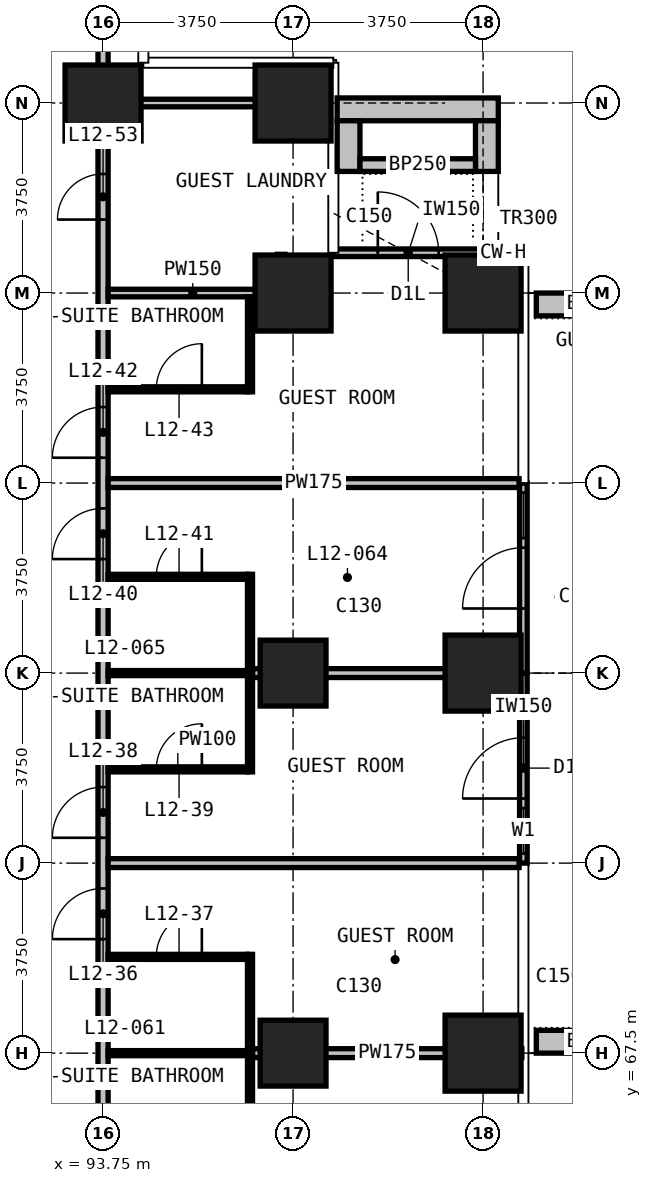
"""IFC4 building model, lengths in metres.
Left out: names, types, materials, properties, quantities, classifications, styles, units other than length and angle.
Written with IfcOpenShell. Run it as: python <this file> out.ifc"""

import sys

from ifc_helpers import new_model, si_unit, direction, frame, frame_2d, origin, origin_2d, place, context, subcontext, project, spatial, rectangle, extrude, element, fill, save


model = new_model("IFC4")
c1 = context("Model", 3, precision=1e-05, world=origin(), true_north=direction((0.0, 1.0)))
c2 = subcontext(c1, "Body", "Model", "MODEL_VIEW")
j1 = project(units=[si_unit("LENGTHUNIT", "METRE"), si_unit("PLANEANGLEUNIT", "RADIAN")], contexts=[c1])
p1 = place(None, origin())
s1 = spatial("IfcSite", under=j1, at=p1, CompositionType="ELEMENT")
p2 = place(p1, origin())
s2 = spatial("IfcBuilding", under=s1, at=p2, CompositionType="ELEMENT")
p3 = place(p2, frame((0.0, 0.0, 59.3)))
s3 = spatial("IfcBuildingStorey", under=s2, at=p3, CompositionType="ELEMENT", Elevation=59.3)
p4 = place(p3, frame((93.75, 86.25, 0.0), z_axis=(0.0, 0.0, 1.0), x_axis=(1.0, 0.0, 0.0)))
e1 = element("IfcColumn", 1, at=p4, inside=s3, PredefinedType="COLUMN", context=c2, shape_type="SweptSolid", body=[
    extrude(rectangle(XDim=1.5, YDim=1.5, at=origin_2d()), origin(), (0.0, 0.0, 1.0), 3.3),
])
for number, where, z_axis, x_axis in (
    (2, (97.5, 67.5, 0.0), (0.0, 0.0, 1.0), (1.0, 0.0, 0.0)),
    (3, (97.5, 75.0, 0.0), (0.0, 0.0, 1.0), (1.0, 0.0, 0.0)),
):
    element("IfcColumn", number, at=place(p3, frame(where, z_axis=z_axis, x_axis=x_axis)), inside=s3, PredefinedType="COLUMN", context=c2, shape_type="SweptSolid", body=[
        extrude(rectangle(XDim=1.3, YDim=1.3, at=origin_2d()), origin(), (0.0, 0.0, 1.0), 3.3),
    ])
for number, where, z_axis, x_axis in (
    (4, (97.5, 82.5, 0.0), (0.0, 0.0, 1.0), (1.0, 0.0, 0.0)),
    (5, (97.5, 86.25, 0.0), (0.0, 0.0, 1.0), (1.0, 0.0, 0.0)),
    (6, (101.25, 67.5, 0.0), (0.0, 0.0, 1.0), (1.0, 0.0, 0.0)),
    (7, (101.25, 75.0, 0.0), (0.0, 0.0, 1.0), (1.0, 0.0, 0.0)),
    (8, (101.25, 82.5, 0.0), (0.0, 0.0, 1.0), (1.0, 0.0, 0.0)),
):
    element("IfcColumn", number, at=place(p3, frame(where, z_axis=z_axis, x_axis=x_axis)), inside=s3, PredefinedType="COLUMN", context=c2, shape_type="SweptSolid", body=[
        extrude(rectangle(XDim=1.5, YDim=1.5, at=origin_2d()), origin(), (0.0, 0.0, 1.0), 3.3),
    ])
p5 = place(p3, frame((102.045, 71.25, 0.0), z_axis=(0.0, 0.0, 1.0), x_axis=(0.0, 1.0, 0.0)))
e9 = element("IfcWall", 9, at=p5, inside=s3, PredefinedType="SOLIDWALL", context=c2, shape_type="SweptSolid", body=[
    extrude(rectangle(XDim=3.75, YDim=0.15, at=frame_2d((1.875, 0.0))), origin(), (0.0, 0.0, 1.0), 3.0),
])
p6 = place(p5, frame((0.188, 0.0, 0.1)))
e10 = element("IfcOpeningElement", 10, at=p6, cuts=e9, PredefinedType="OPENING", context=c2, shape_type="SweptSolid", body=[
    extrude(rectangle(XDim=0.9, YDim=2.4, at=frame_2d((0.45, 1.2))), frame((0.0, 0.085, 0.0), z_axis=(0.0, -1.0, 0.0), x_axis=(1.0, 0.0, 0.0)), (0.0, 0.0, 1.0), 0.17),
])
p7 = place(p5, frame((1.275, 0.0, 0.0)))
e11 = element("IfcOpeningElement", 11, at=p7, cuts=e9, PredefinedType="OPENING", context=c2, shape_type="SweptSolid", body=[
    extrude(rectangle(XDim=1.2, YDim=2.4, at=frame_2d((0.6, 1.2))), frame((0.0, 0.085, 0.0), z_axis=(0.0, -1.0, 0.0), x_axis=(1.0, 0.0, 0.0)), (0.0, 0.0, 1.0), 0.17),
])
p8 = place(p3, frame((102.045, 75.0, 0.0), z_axis=(0.0, 0.0, 1.0), x_axis=(0.0, 1.0, 0.0)))
e12 = element("IfcWall", 12, at=p8, inside=s3, PredefinedType="SOLIDWALL", context=c2, shape_type="SweptSolid", body=[
    extrude(rectangle(XDim=3.75, YDim=0.15, at=frame_2d((1.875, 0.0))), origin(), (0.0, 0.0, 1.0), 3.0),
])
p9 = place(p8, frame((1.275, 0.0, 0.0)))
e13 = element("IfcOpeningElement", 13, at=p9, cuts=e12, PredefinedType="OPENING", context=c2, shape_type="SweptSolid", body=[
    extrude(rectangle(XDim=1.2, YDim=2.4, at=frame_2d((0.6, 1.2))), frame((0.0, 0.085, 0.0), z_axis=(0.0, -1.0, 0.0), x_axis=(1.0, 0.0, 0.0)), (0.0, 0.0, 1.0), 0.17),
])
p10 = place(p8, frame((2.663, 0.0, 0.1)))
e14 = element("IfcOpeningElement", 14, at=p10, cuts=e12, PredefinedType="OPENING", context=c2, shape_type="SweptSolid", body=[
    extrude(rectangle(XDim=0.9, YDim=2.4, at=frame_2d((0.45, 1.2))), frame((0.0, 0.085, 0.0), z_axis=(0.0, -1.0, 0.0), x_axis=(1.0, 0.0, 0.0)), (0.0, 0.0, 1.0), 0.17),
])
p11 = place(p3, frame((98.295, 83.295, 0.0), z_axis=(0.0, 0.0, 1.0), x_axis=(1.0, 0.0, 0.0)))
e15 = element("IfcWall", 15, at=p11, inside=s3, PredefinedType="SOLIDWALL", context=c2, shape_type="SweptSolid", body=[
    extrude(rectangle(XDim=2.955, YDim=0.15, at=frame_2d((1.478, 0.0))), origin(), (0.0, 0.0, 1.0), 3.0),
])
p12 = place(p11, frame((0.877, 0.0, 0.0)))
e16 = element("IfcOpeningElement", 16, at=p12, cuts=e15, PredefinedType="OPENING", context=c2, shape_type="SweptSolid", body=[
    extrude(rectangle(XDim=1.2, YDim=2.0, at=frame_2d((0.6, 1.0))), frame((0.0, 0.085, 0.0), z_axis=(0.0, -1.0, 0.0), x_axis=(1.0, 0.0, 0.0)), (0.0, 0.0, 1.0), 0.17),
])
for number, where, z_axis, x_axis in (
    (17, (102.3, 67.725, 0.0), (0.0, 0.0, 1.0), (1.0, 0.0, 0.0)),
    (18, (102.3, 82.275, 0.0), (0.0, 0.0, 1.0), (1.0, 0.0, 0.0)),
):
    element("IfcWall", number, at=place(p3, frame(where, z_axis=z_axis, x_axis=x_axis)), inside=s3, PredefinedType="USERDEFINED", context=c2, shape_type="SweptSolid", body=[
        extrude(rectangle(XDim=2.35, YDim=0.45, at=frame_2d((1.175, 0.0))), origin(), (0.0, 0.0, 1.0), 1.1),
    ])
p13 = place(p3, frame((98.37, 86.125, 0.0), z_axis=(0.0, 0.0, 1.0), x_axis=(1.0, 0.0, 0.0)))
e19 = element("IfcWall", 19, at=p13, inside=s3, PredefinedType="USERDEFINED", context=c2, shape_type="SweptSolid", body=[
    extrude(rectangle(XDim=3.18, YDim=0.45, at=frame_2d((1.59, 0.0))), origin(), (0.0, 0.0, 1.0), 1.1),
])
for number, where, z_axis, x_axis in (
    (20, (98.595, 84.9, 0.0), (0.0, 0.0, 1.0), (0.0, 1.0, 0.0)),
    (21, (101.325, 84.9, 0.0), (0.0, 0.0, 1.0), (0.0, 1.0, 0.0)),
):
    element("IfcWall", number, at=place(p3, frame(where, z_axis=z_axis, x_axis=x_axis)), inside=s3, PredefinedType="USERDEFINED", context=c2, shape_type="SweptSolid", body=[
        extrude(rectangle(XDim=1.0, YDim=0.45, at=frame_2d((0.5, 0.0))), origin(), (0.0, 0.0, 1.0), 1.1),
    ])
p14 = place(p3, frame((98.82, 85.025, 0.0), z_axis=(0.0, 0.0, 1.0), x_axis=(1.0, 0.0, 0.0)))
e22 = element("IfcWall", 22, at=p14, inside=s3, PredefinedType="USERDEFINED", context=c2, shape_type="SweptSolid", body=[
    extrude(rectangle(XDim=2.28, YDim=0.25, at=frame_2d((1.14, 0.0))), origin(), (0.0, 0.0, 1.0), 1.0),
])
p15 = place(p3, frame((93.75, 52.4, 0.0), z_axis=(0.0, 0.0, 1.0), x_axis=(0.0, 1.0, 0.0)))
e23 = element("IfcWall", 23, at=p15, inside=s3, PredefinedType="PARTITIONING", context=c2, shape_type="SweptSolid", body=[
    extrude(rectangle(XDim=33.925, YDim=0.2, at=frame_2d((16.962, 0.0))), origin(), (0.0, 0.0, 1.0), 3.0),
])
p16 = place(p15, frame((2.35, 0.0, 0.0)))
e24 = element("IfcOpeningElement", 24, at=p16, cuts=e23, PredefinedType="OPENING", context=c2, shape_type="SweptSolid", body=[
    extrude(rectangle(XDim=1.0, YDim=2.2, at=frame_2d((0.5, 1.1))), frame((0.0, 0.11, 0.0), z_axis=(0.0, -1.0, 0.0), x_axis=(1.0, 0.0, 0.0)), (0.0, 0.0, 1.0), 0.22),
])
p17 = place(p15, frame((4.35, 0.0, 0.0)))
e25 = element("IfcOpeningElement", 25, at=p17, cuts=e23, PredefinedType="OPENING", context=c2, shape_type="SweptSolid", body=[
    extrude(rectangle(XDim=1.0, YDim=2.2, at=frame_2d((0.5, 1.1))), frame((0.0, 0.11, 0.0), z_axis=(0.0, -1.0, 0.0), x_axis=(1.0, 0.0, 0.0)), (0.0, 0.0, 1.0), 0.22),
])
p18 = place(p15, frame((9.85, 0.0, 0.0)))
e26 = element("IfcOpeningElement", 26, at=p18, cuts=e23, PredefinedType="OPENING", context=c2, shape_type="SweptSolid", body=[
    extrude(rectangle(XDim=1.0, YDim=2.2, at=frame_2d((0.5, 1.1))), frame((0.0, 0.11, 0.0), z_axis=(0.0, -1.0, 0.0), x_axis=(1.0, 0.0, 0.0)), (0.0, 0.0, 1.0), 0.22),
])
p19 = place(p15, frame((11.85, 0.0, 0.0)))
e27 = element("IfcOpeningElement", 27, at=p19, cuts=e23, PredefinedType="OPENING", context=c2, shape_type="SweptSolid", body=[
    extrude(rectangle(XDim=1.0, YDim=2.2, at=frame_2d((0.5, 1.1))), frame((0.0, 0.11, 0.0), z_axis=(0.0, -1.0, 0.0), x_axis=(1.0, 0.0, 0.0)), (0.0, 0.0, 1.0), 0.22),
])
p20 = place(p15, frame((17.35, 0.0, 0.0)))
e28 = element("IfcOpeningElement", 28, at=p20, cuts=e23, PredefinedType="OPENING", context=c2, shape_type="SweptSolid", body=[
    extrude(rectangle(XDim=1.0, YDim=2.2, at=frame_2d((0.5, 1.1))), frame((0.0, 0.11, 0.0), z_axis=(0.0, -1.0, 0.0), x_axis=(1.0, 0.0, 0.0)), (0.0, 0.0, 1.0), 0.22),
])
p21 = place(p15, frame((19.35, 0.0, 0.0)))
e29 = element("IfcOpeningElement", 29, at=p21, cuts=e23, PredefinedType="OPENING", context=c2, shape_type="SweptSolid", body=[
    extrude(rectangle(XDim=1.0, YDim=2.2, at=frame_2d((0.5, 1.1))), frame((0.0, 0.11, 0.0), z_axis=(0.0, -1.0, 0.0), x_axis=(1.0, 0.0, 0.0)), (0.0, 0.0, 1.0), 0.22),
])
p22 = place(p15, frame((24.85, 0.0, 0.0)))
e30 = element("IfcOpeningElement", 30, at=p22, cuts=e23, PredefinedType="OPENING", context=c2, shape_type="SweptSolid", body=[
    extrude(rectangle(XDim=1.0, YDim=2.2, at=frame_2d((0.5, 1.1))), frame((0.0, 0.11, 0.0), z_axis=(0.0, -1.0, 0.0), x_axis=(1.0, 0.0, 0.0)), (0.0, 0.0, 1.0), 0.22),
])
p23 = place(p15, frame((26.85, 0.0, 0.0)))
e31 = element("IfcOpeningElement", 31, at=p23, cuts=e23, PredefinedType="OPENING", context=c2, shape_type="SweptSolid", body=[
    extrude(rectangle(XDim=1.0, YDim=2.2, at=frame_2d((0.5, 1.1))), frame((0.0, 0.11, 0.0), z_axis=(0.0, -1.0, 0.0), x_axis=(1.0, 0.0, 0.0)), (0.0, 0.0, 1.0), 0.22),
])
p24 = place(p15, frame((31.55, 0.0, 0.0)))
e32 = element("IfcOpeningElement", 32, at=p24, cuts=e23, PredefinedType="OPENING", context=c2, shape_type="SweptSolid", body=[
    extrude(rectangle(XDim=0.9, YDim=2.2, at=frame_2d((0.45, 1.1))), frame((0.0, 0.11, 0.0), z_axis=(0.0, -1.0, 0.0), x_axis=(1.0, 0.0, 0.0)), (0.0, 0.0, 1.0), 0.22),
])
p25 = place(p3, frame((93.75, 86.28, 0.0), z_axis=(0.0, 0.0, 1.0), x_axis=(0.0, 1.0, 0.0)))
e33 = element("IfcWall", 33, at=p25, inside=s3, PredefinedType="PARTITIONING", context=c2, shape_type="SweptSolid", body=[
    extrude(rectangle(XDim=4.365, YDim=0.2, at=frame_2d((2.183, 0.0))), origin(), (0.0, 0.0, 1.0), 3.0),
])
p26 = place(p3, frame((96.7, 67.5, 0.0), z_axis=(0.0, 0.0, 1.0), x_axis=(1.0, 0.0, 0.0)))
e34 = element("IfcWall", 34, at=p26, inside=s3, PredefinedType="PARTITIONING", context=c2, shape_type="SweptSolid", body=[
    extrude(rectangle(XDim=5.315, YDim=0.175, at=frame_2d((2.657, 0.0))), origin(), (0.0, 0.0, 1.0), 3.0),
])
p27 = place(p3, frame((93.85, 71.25, 0.0), z_axis=(0.0, 0.0, 1.0), x_axis=(1.0, 0.0, 0.0)))
e35 = element("IfcWall", 35, at=p27, inside=s3, PredefinedType="PARTITIONING", context=c2, shape_type="SweptSolid", body=[
    extrude(rectangle(XDim=8.11, YDim=0.175, at=frame_2d((4.055, 0.0))), origin(), (0.0, 0.0, 1.0), 3.0),
])
p28 = place(p3, frame((96.7, 75.0, 0.0), z_axis=(0.0, 0.0, 1.0), x_axis=(1.0, 0.0, 0.0)))
e36 = element("IfcWall", 36, at=p28, inside=s3, PredefinedType="PARTITIONING", context=c2, shape_type="SweptSolid", body=[
    extrude(rectangle(XDim=5.26, YDim=0.175, at=frame_2d((2.63, 0.0))), origin(), (0.0, 0.0, 1.0), 3.0),
])
p29 = place(p3, frame((93.85, 78.75, 0.0), z_axis=(0.0, 0.0, 1.0), x_axis=(1.0, 0.0, 0.0)))
e37 = element("IfcWall", 37, at=p29, inside=s3, PredefinedType="PARTITIONING", context=c2, shape_type="SweptSolid", body=[
    extrude(rectangle(XDim=8.11, YDim=0.175, at=frame_2d((4.055, 0.0))), origin(), (0.0, 0.0, 1.0), 3.0),
])
p30 = place(p3, frame((93.85, 82.5, 0.0), z_axis=(0.0, 0.0, 1.0), x_axis=(1.0, 0.0, 0.0)))
e38 = element("IfcWall", 38, at=p30, inside=s3, PredefinedType="PARTITIONING", context=c2, shape_type="SweptSolid", body=[
    extrude(rectangle(XDim=3.34, YDim=0.15, at=frame_2d((1.67, 0.0))), origin(), (0.0, 0.0, 1.0), 3.0),
])
p31 = place(p3, frame((93.85, 86.25, 0.0), z_axis=(0.0, 0.0, 1.0), x_axis=(1.0, 0.0, 0.0)))
e39 = element("IfcWall", 39, at=p31, inside=s3, PredefinedType="PARTITIONING", context=c2, shape_type="SweptSolid", body=[
    extrude(rectangle(XDim=4.295, YDim=0.15, at=frame_2d((2.147, 0.0))), origin(), (0.0, 0.0, 1.0), 3.0),
])
p32 = place(p3, frame((97.265, 82.425, 0.0), z_axis=(0.0, 0.0, 1.0), x_axis=(0.0, 1.0, 0.0)))
e40 = element("IfcWall", 40, at=p32, inside=s3, PredefinedType="PARTITIONING", context=c2, shape_type="SweptSolid", body=[
    extrude(rectangle(XDim=0.84, YDim=0.15, at=frame_2d((0.42, 0.0))), origin(), (0.0, 0.0, 1.0), 3.0),
])
p33 = place(p3, frame((93.85, 67.5, 0.0), z_axis=(0.0, 0.0, 1.0), x_axis=(1.0, 0.0, 0.0)))
e41 = element("IfcWall", 41, at=p33, inside=s3, PredefinedType="PARTITIONING", context=c2, shape_type="SweptSolid", body=[
    extrude(rectangle(XDim=2.75, YDim=0.1, at=frame_2d((1.375, 0.0))), origin(), (0.0, 0.0, 1.0), 3.0),
])
p34 = place(p3, frame((93.85, 69.4, 0.0), z_axis=(0.0, 0.0, 1.0), x_axis=(1.0, 0.0, 0.0)))
e42 = element("IfcWall", 42, at=p34, inside=s3, PredefinedType="PARTITIONING", context=c2, shape_type="SweptSolid", body=[
    extrude(rectangle(XDim=2.75, YDim=0.1, at=frame_2d((1.375, 0.0))), origin(), (0.0, 0.0, 1.0), 3.0),
])
p35 = place(p34, frame((0.95, 0.0, 0.0)))
e43 = element("IfcOpeningElement", 43, at=p35, cuts=e42, PredefinedType="OPENING", context=c2, shape_type="SweptSolid", body=[
    extrude(rectangle(XDim=0.9, YDim=2.2, at=frame_2d((0.45, 1.1))), frame((0.0, 0.06, 0.0), z_axis=(0.0, -1.0, 0.0), x_axis=(1.0, 0.0, 0.0)), (0.0, 0.0, 1.0), 0.12),
])
p36 = place(p3, frame((93.85, 73.1, 0.0), z_axis=(0.0, 0.0, 1.0), x_axis=(1.0, 0.0, 0.0)))
e44 = element("IfcWall", 44, at=p36, inside=s3, PredefinedType="PARTITIONING", context=c2, shape_type="SweptSolid", body=[
    extrude(rectangle(XDim=2.75, YDim=0.1, at=frame_2d((1.375, 0.0))), origin(), (0.0, 0.0, 1.0), 3.0),
])
p37 = place(p36, frame((0.95, 0.0, 0.0)))
e45 = element("IfcOpeningElement", 45, at=p37, cuts=e44, PredefinedType="OPENING", context=c2, shape_type="SweptSolid", body=[
    extrude(rectangle(XDim=0.9, YDim=2.2, at=frame_2d((0.45, 1.1))), frame((0.0, 0.06, 0.0), z_axis=(0.0, -1.0, 0.0), x_axis=(1.0, 0.0, 0.0)), (0.0, 0.0, 1.0), 0.12),
])
p38 = place(p3, frame((93.85, 75.0, 0.0), z_axis=(0.0, 0.0, 1.0), x_axis=(1.0, 0.0, 0.0)))
e46 = element("IfcWall", 46, at=p38, inside=s3, PredefinedType="PARTITIONING", context=c2, shape_type="SweptSolid", body=[
    extrude(rectangle(XDim=2.75, YDim=0.1, at=frame_2d((1.375, 0.0))), origin(), (0.0, 0.0, 1.0), 3.0),
])
p39 = place(p3, frame((93.85, 76.9, 0.0), z_axis=(0.0, 0.0, 1.0), x_axis=(1.0, 0.0, 0.0)))
e47 = element("IfcWall", 47, at=p39, inside=s3, PredefinedType="PARTITIONING", context=c2, shape_type="SweptSolid", body=[
    extrude(rectangle(XDim=2.75, YDim=0.1, at=frame_2d((1.375, 0.0))), origin(), (0.0, 0.0, 1.0), 3.0),
])
p40 = place(p39, frame((0.95, 0.0, 0.0)))
e48 = element("IfcOpeningElement", 48, at=p40, cuts=e47, PredefinedType="OPENING", context=c2, shape_type="SweptSolid", body=[
    extrude(rectangle(XDim=0.9, YDim=2.2, at=frame_2d((0.45, 1.1))), frame((0.0, 0.06, 0.0), z_axis=(0.0, -1.0, 0.0), x_axis=(1.0, 0.0, 0.0)), (0.0, 0.0, 1.0), 0.12),
])
p41 = place(p3, frame((93.85, 80.6, 0.0), z_axis=(0.0, 0.0, 1.0), x_axis=(1.0, 0.0, 0.0)))
e49 = element("IfcWall", 49, at=p41, inside=s3, PredefinedType="PARTITIONING", context=c2, shape_type="SweptSolid", body=[
    extrude(rectangle(XDim=2.75, YDim=0.1, at=frame_2d((1.375, 0.0))), origin(), (0.0, 0.0, 1.0), 3.0),
])
p42 = place(p41, frame((0.95, 0.0, 0.0)))
e50 = element("IfcOpeningElement", 50, at=p42, cuts=e49, PredefinedType="OPENING", context=c2, shape_type="SweptSolid", body=[
    extrude(rectangle(XDim=0.9, YDim=2.2, at=frame_2d((0.45, 1.1))), frame((0.0, 0.06, 0.0), z_axis=(0.0, -1.0, 0.0), x_axis=(1.0, 0.0, 0.0)), (0.0, 0.0, 1.0), 0.12),
])
for number, where, z_axis, x_axis in (
    (51, (96.65, 65.55, 0.0), (0.0, 0.0, 1.0), (0.0, 1.0, 0.0)),
    (52, (96.65, 73.05, 0.0), (0.0, 0.0, 1.0), (0.0, 1.0, 0.0)),
):
    element("IfcWall", number, at=place(p3, frame(where, z_axis=z_axis, x_axis=x_axis)), inside=s3, PredefinedType="PARTITIONING", context=c2, shape_type="SweptSolid", body=[
        extrude(rectangle(XDim=3.9, YDim=0.1, at=frame_2d((1.95, 0.0))), origin(), (0.0, 0.0, 1.0), 3.0),
    ])
p43 = place(p3, frame((96.65, 80.55, 0.0), z_axis=(0.0, 0.0, 1.0), x_axis=(0.0, 1.0, 0.0)))
e53 = element("IfcWall", 53, at=p43, inside=s3, PredefinedType="PARTITIONING", context=c2, shape_type="SweptSolid", body=[
    extrude(rectangle(XDim=1.875, YDim=0.1, at=frame_2d((0.938, 0.0))), origin(), (0.0, 0.0, 1.0), 3.0),
])
p44 = place(p6, origin())
e54 = element("IfcWindow", 54, at=p44, inside=s3, PartitioningType="SINGLE_PANEL", PredefinedType="WINDOW", context=c2, shape_type="SweptSolid", body=[
    extrude(rectangle(XDim=0.9, YDim=2.4, at=frame_2d((0.45, 1.2))), frame((0.0, 0.03, 0.0), z_axis=(0.0, -1.0, 0.0), x_axis=(1.0, 0.0, 0.0)), (0.0, 0.0, 1.0), 0.06),
])
fill(e10, e54)
p45 = place(p7, origin())
e55 = element("IfcDoor", 55, at=p45, inside=s3, OperationType="SINGLE_SWING_LEFT", PredefinedType="DOOR", context=c2, shape_type="SweptSolid", body=[
    extrude(rectangle(XDim=1.2, YDim=2.4, at=frame_2d((0.6, 1.2))), frame((0.0, 0.025, 0.0), z_axis=(0.0, -1.0, 0.0), x_axis=(1.0, 0.0, 0.0)), (0.0, 0.0, 1.0), 0.05),
])
fill(e11, e55)
p46 = place(p9, origin())
e56 = element("IfcDoor", 56, at=p46, inside=s3, OperationType="SINGLE_SWING_LEFT", PredefinedType="DOOR", context=c2, shape_type="SweptSolid", body=[
    extrude(rectangle(XDim=1.2, YDim=2.4, at=frame_2d((0.6, 1.2))), frame((0.0, 0.025, 0.0), z_axis=(0.0, -1.0, 0.0), x_axis=(1.0, 0.0, 0.0)), (0.0, 0.0, 1.0), 0.05),
])
fill(e13, e56)
p47 = place(p10, origin())
e57 = element("IfcWindow", 57, at=p47, inside=s3, PartitioningType="SINGLE_PANEL", PredefinedType="WINDOW", context=c2, shape_type="SweptSolid", body=[
    extrude(rectangle(XDim=0.9, YDim=2.4, at=frame_2d((0.45, 1.2))), frame((0.0, 0.03, 0.0), z_axis=(0.0, -1.0, 0.0), x_axis=(1.0, 0.0, 0.0)), (0.0, 0.0, 1.0), 0.06),
])
fill(e14, e57)
p48 = place(p12, origin())
e58 = element("IfcDoor", 58, at=p48, inside=s3, OperationType="SINGLE_SWING_LEFT", PredefinedType="DOOR", context=c2, shape_type="SweptSolid", body=[
    extrude(rectangle(XDim=1.2, YDim=2.0, at=frame_2d((0.6, 1.0))), frame((0.0, 0.025, 0.0), z_axis=(0.0, -1.0, 0.0), x_axis=(1.0, 0.0, 0.0)), (0.0, 0.0, 1.0), 0.05),
])
fill(e16, e58)
p49 = place(p20, origin())
e59 = element("IfcDoor", 59, at=p49, inside=s3, OperationType="SINGLE_SWING_LEFT", PredefinedType="DOOR", context=c2, shape_type="SweptSolid", body=[
    extrude(rectangle(XDim=1.0, YDim=2.2, at=frame_2d((0.5, 1.1))), frame((0.0, 0.025, 0.0), z_axis=(0.0, -1.0, 0.0), x_axis=(1.0, 0.0, 0.0)), (0.0, 0.0, 1.0), 0.05),
])
fill(e28, e59)
p50 = place(p35, origin())
e60 = element("IfcDoor", 60, at=p50, inside=s3, OperationType="SINGLE_SWING_RIGHT", PredefinedType="DOOR", context=c2, shape_type="SweptSolid", body=[
    extrude(rectangle(XDim=0.9, YDim=2.2, at=frame_2d((0.45, 1.1))), frame((0.0, 0.025, 0.0), z_axis=(0.0, -1.0, 0.0), x_axis=(1.0, 0.0, 0.0)), (0.0, 0.0, 1.0), 0.05),
])
fill(e43, e60)
p51 = place(p21, origin())
e61 = element("IfcDoor", 61, at=p51, inside=s3, OperationType="SINGLE_SWING_LEFT", PredefinedType="DOOR", context=c2, shape_type="SweptSolid", body=[
    extrude(rectangle(XDim=1.0, YDim=2.2, at=frame_2d((0.5, 1.1))), frame((0.0, 0.025, 0.0), z_axis=(0.0, -1.0, 0.0), x_axis=(1.0, 0.0, 0.0)), (0.0, 0.0, 1.0), 0.05),
])
fill(e29, e61)
p52 = place(p37, origin())
e62 = element("IfcDoor", 62, at=p52, inside=s3, OperationType="SINGLE_SWING_RIGHT", PredefinedType="DOOR", context=c2, shape_type="SweptSolid", body=[
    extrude(rectangle(XDim=0.9, YDim=2.2, at=frame_2d((0.45, 1.1))), frame((0.0, 0.025, 0.0), z_axis=(0.0, -1.0, 0.0), x_axis=(1.0, 0.0, 0.0)), (0.0, 0.0, 1.0), 0.05),
])
fill(e45, e62)
p53 = place(p22, origin())
e63 = element("IfcDoor", 63, at=p53, inside=s3, OperationType="SINGLE_SWING_RIGHT", PredefinedType="DOOR", context=c2, shape_type="SweptSolid", body=[
    extrude(rectangle(XDim=1.0, YDim=2.2, at=frame_2d((0.5, 1.1))), frame((0.0, 0.025, 0.0), z_axis=(0.0, -1.0, 0.0), x_axis=(1.0, 0.0, 0.0)), (0.0, 0.0, 1.0), 0.05),
])
fill(e30, e63)
p54 = place(p40, origin())
e64 = element("IfcDoor", 64, at=p54, inside=s3, OperationType="SINGLE_SWING_RIGHT", PredefinedType="DOOR", context=c2, shape_type="SweptSolid", body=[
    extrude(rectangle(XDim=0.9, YDim=2.2, at=frame_2d((0.45, 1.1))), frame((0.0, 0.025, 0.0), z_axis=(0.0, -1.0, 0.0), x_axis=(1.0, 0.0, 0.0)), (0.0, 0.0, 1.0), 0.05),
])
fill(e48, e64)
p55 = place(p23, origin())
e65 = element("IfcDoor", 65, at=p55, inside=s3, OperationType="SINGLE_SWING_RIGHT", PredefinedType="DOOR", context=c2, shape_type="SweptSolid", body=[
    extrude(rectangle(XDim=1.0, YDim=2.2, at=frame_2d((0.5, 1.1))), frame((0.0, 0.025, 0.0), z_axis=(0.0, -1.0, 0.0), x_axis=(1.0, 0.0, 0.0)), (0.0, 0.0, 1.0), 0.05),
])
fill(e31, e65)
p56 = place(p42, origin())
e66 = element("IfcDoor", 66, at=p56, inside=s3, OperationType="SINGLE_SWING_RIGHT", PredefinedType="DOOR", context=c2, shape_type="SweptSolid", body=[
    extrude(rectangle(XDim=0.9, YDim=2.2, at=frame_2d((0.45, 1.1))), frame((0.0, 0.025, 0.0), z_axis=(0.0, -1.0, 0.0), x_axis=(1.0, 0.0, 0.0)), (0.0, 0.0, 1.0), 0.05),
])
fill(e50, e66)
p57 = place(p24, origin())
e67 = element("IfcDoor", 67, at=p57, inside=s3, OperationType="SINGLE_SWING_LEFT", PredefinedType="DOOR", context=c2, shape_type="SweptSolid", body=[
    extrude(rectangle(XDim=0.9, YDim=2.2, at=frame_2d((0.45, 1.1))), frame((0.0, 0.025, 0.0), z_axis=(0.0, -1.0, 0.0), x_axis=(1.0, 0.0, 0.0)), (0.0, 0.0, 1.0), 0.05),
])
fill(e32, e67)
save(model, sys.argv[1])
